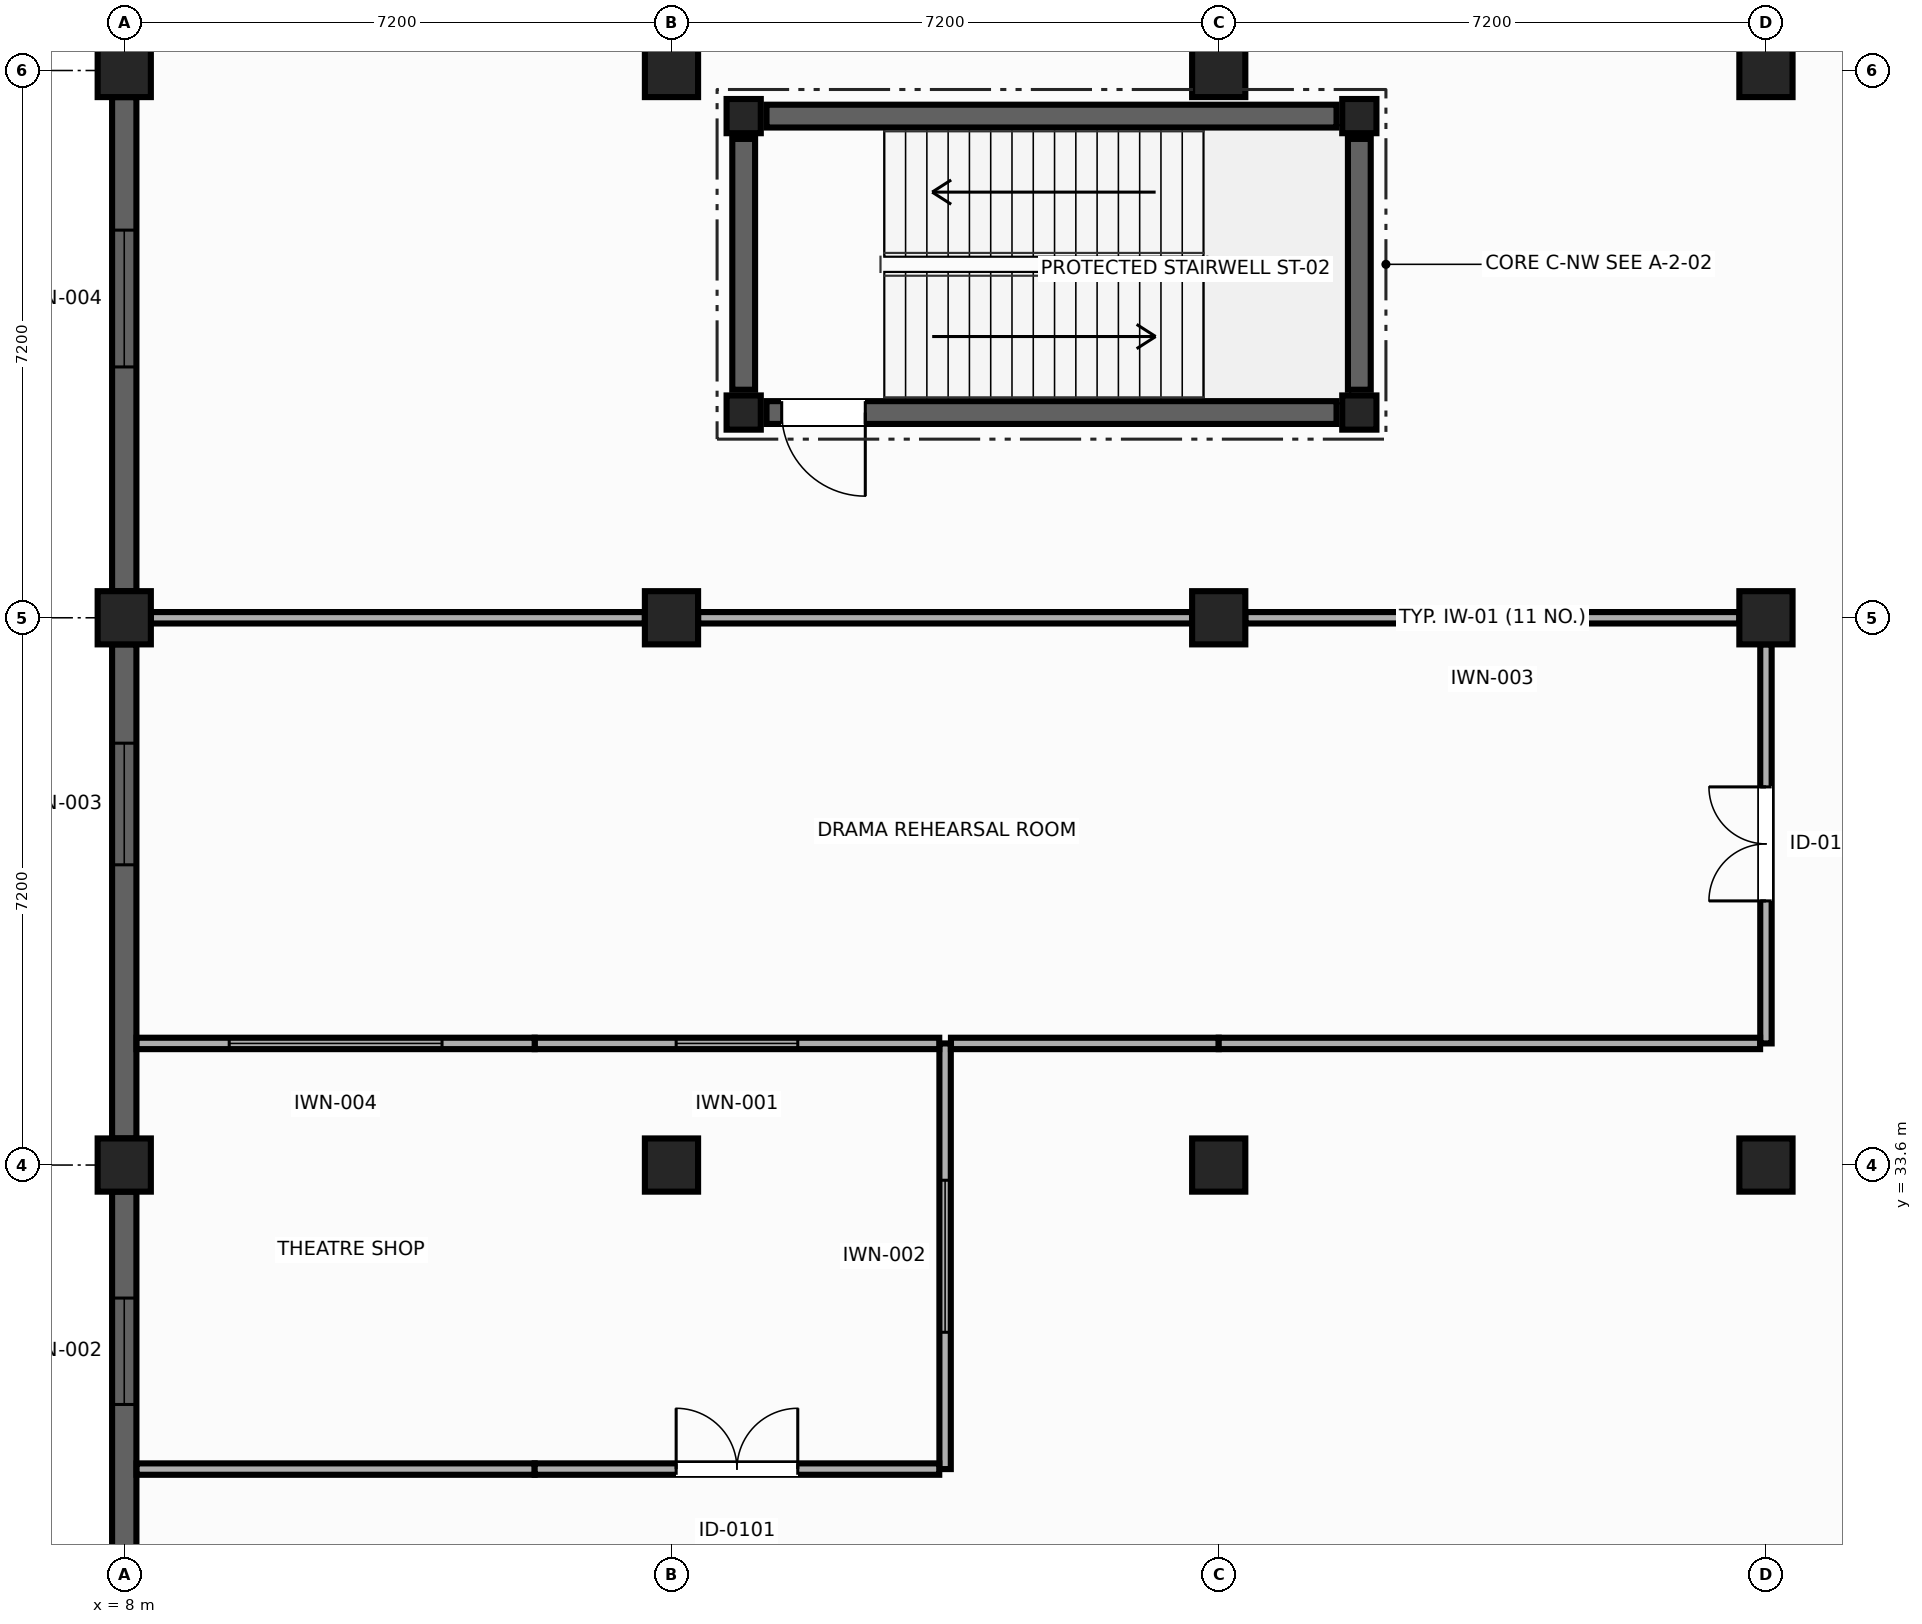
"""IFC4 building model, lengths in metres.
Left out: names, types, materials, properties, quantities, classifications, styles, units other than length and angle.
Written with IfcOpenShell. Run it as: python <this file> out.ifc"""

import sys

from ifc_helpers import new_model, si_unit, direction, frame, frame_2d, origin, origin_2d, place, context, subcontext, project, spatial, rectangle, extrude, element, fill, save


model = new_model("IFC4")
c1 = context("Model", 3, precision=1e-05, world=origin(), true_north=direction((0.0, 1.0)))
c2 = subcontext(c1, "Body", "Model", "MODEL_VIEW")
j1 = project(units=[si_unit("LENGTHUNIT", "METRE"), si_unit("PLANEANGLEUNIT", "RADIAN")], contexts=[c1])
p1 = place(None, origin())
s1 = spatial("IfcSite", under=j1, at=p1, CompositionType="ELEMENT")
p2 = place(p1, origin())
s2 = spatial("IfcBuilding", under=s1, at=p2, CompositionType="ELEMENT")
p3 = place(p2, origin())
s3 = spatial("IfcBuildingStorey", under=s2, at=p3, CompositionType="ELEMENT", Elevation=0.0)
for number, where, z_axis, x_axis in (
    (1, (8.0, 33.6, 0.0), (0.0, 0.0, 1.0), (0.0, 1.0, 0.0)),
    (2, (15.2, 33.6, 0.0), (0.0, 0.0, 1.0), (1.0, 0.0, 0.0)),
):
    element("IfcColumn", number, at=place(p3, frame(where, z_axis=z_axis, x_axis=x_axis)), inside=s3, PredefinedType="COLUMN", context=c2, shape_type="SweptSolid", body=[
        extrude(rectangle(XDim=0.7, YDim=0.7, at=origin_2d()), origin(), (0.0, 0.0, 1.0), 5.4),
    ])
for number, where, z_axis, x_axis in (
    (3, (22.4, 33.6, 0.0), (0.0, 0.0, 1.0), (1.0, 0.0, 0.0)),
    (4, (29.6, 33.6, 0.0), (0.0, 0.0, 1.0), (0.0, 1.0, 0.0)),
):
    element("IfcColumn", number, at=place(p3, frame(where, z_axis=z_axis, x_axis=x_axis)), inside=s3, PredefinedType="COLUMN", context=c2, shape_type="SweptSolid", body=[
        extrude(rectangle(XDim=0.7, YDim=0.7, at=origin_2d()), origin(), (0.0, 0.0, 1.0), 5.12),
    ])
for number, where, z_axis, x_axis in (
    (5, (8.0, 40.8, 0.0), (0.0, 0.0, 1.0), (1.0, 0.0, 0.0)),
    (6, (15.2, 40.8, 0.0), (0.0, 0.0, 1.0), (1.0, 0.0, 0.0)),
):
    element("IfcColumn", number, at=place(p3, frame(where, z_axis=z_axis, x_axis=x_axis)), inside=s3, PredefinedType="COLUMN", context=c2, shape_type="SweptSolid", body=[
        extrude(rectangle(XDim=0.7, YDim=0.7, at=origin_2d()), origin(), (0.0, 0.0, 1.0), 5.4),
    ])
for number, where, z_axis, x_axis in (
    (7, (22.4, 40.8, 0.0), (0.0, 0.0, 1.0), (0.0, 1.0, 0.0)),
    (8, (29.6, 40.8, 0.0), (0.0, 0.0, 1.0), (1.0, 0.0, 0.0)),
):
    element("IfcColumn", number, at=place(p3, frame(where, z_axis=z_axis, x_axis=x_axis)), inside=s3, PredefinedType="COLUMN", context=c2, shape_type="SweptSolid", body=[
        extrude(rectangle(XDim=0.7, YDim=0.7, at=origin_2d()), origin(), (0.0, 0.0, 1.0), 5.12),
    ])
for number, where, z_axis, x_axis in (
    (9, (8.0, 48.0, 0.0), (0.0, 0.0, 1.0), (1.0, 0.0, 0.0)),
    (10, (15.2, 48.0, 0.0), (0.0, 0.0, 1.0), (0.0, 1.0, 0.0)),
    (11, (22.4, 48.0, 0.0), (0.0, 0.0, 1.0), (1.0, 0.0, 0.0)),
    (12, (29.6, 48.0, 0.0), (0.0, 0.0, 1.0), (0.0, 1.0, 0.0)),
):
    element("IfcColumn", number, at=place(p3, frame(where, z_axis=z_axis, x_axis=x_axis)), inside=s3, PredefinedType="COLUMN", context=c2, shape_type="SweptSolid", body=[
        extrude(rectangle(XDim=0.7, YDim=0.7, at=origin_2d()), origin(), (0.0, 0.0, 1.0), 5.4),
    ])
for number, where, z_axis, x_axis in (
    (13, (16.15, 43.5, 0.0), (0.0, 0.0, 1.0), (1.0, 0.0, 0.0)),
    (14, (24.25, 43.5, 0.0), (0.0, 0.0, 1.0), (1.0, 0.0, 0.0)),
    (15, (24.25, 47.4, 0.0), (0.0, 0.0, 1.0), (1.0, 0.0, 0.0)),
    (16, (16.15, 47.4, 0.0), (0.0, 0.0, 1.0), (1.0, 0.0, 0.0)),
):
    element("IfcColumn", number, at=place(p3, frame(where, z_axis=z_axis, x_axis=x_axis)), inside=s3, PredefinedType="COLUMN", context=c2, shape_type="SweptSolid", body=[
        extrude(rectangle(XDim=0.45, YDim=0.45, at=origin_2d()), origin(), (0.0, 0.0, 1.0), 5.4),
    ])
p4 = place(p3, frame((8.0, 26.75, 0.0), z_axis=(0.0, 0.0, 1.0), x_axis=(0.0, 1.0, 0.0)))
e17 = element("IfcWall", 17, at=p4, inside=s3, PredefinedType="SOLIDWALL", context=c2, shape_type="SweptSolid", body=[
    extrude(rectangle(XDim=6.5, YDim=0.32, at=frame_2d((3.25, 0.0))), origin(), (0.0, 0.0, 1.0), 5.12),
])
p5 = place(p4, frame((3.7, 0.0, 0.9)))
e18 = element("IfcOpeningElement", 18, at=p5, cuts=e17, PredefinedType="OPENING", context=c2, shape_type="SweptSolid", body=[
    extrude(rectangle(XDim=1.4, YDim=1.8, at=frame_2d((0.7, 0.9))), frame((0.0, 0.17, 0.0), z_axis=(0.0, -1.0, 0.0), x_axis=(1.0, 0.0, 0.0)), (0.0, 0.0, 1.0), 0.34),
])
p6 = place(p3, frame((8.0, 33.95, 0.0), z_axis=(0.0, 0.0, 1.0), x_axis=(0.0, 1.0, 0.0)))
e19 = element("IfcWall", 19, at=p6, inside=s3, PredefinedType="SOLIDWALL", context=c2, shape_type="SweptSolid", body=[
    extrude(rectangle(XDim=6.5, YDim=0.32, at=frame_2d((3.25, 0.0))), origin(), (0.0, 0.0, 1.0), 5.12),
])
p7 = place(p6, frame((3.6, 0.0, 0.9)))
e20 = element("IfcOpeningElement", 20, at=p7, cuts=e19, PredefinedType="OPENING", context=c2, shape_type="SweptSolid", body=[
    extrude(rectangle(XDim=1.6, YDim=1.8, at=frame_2d((0.8, 0.9))), frame((0.0, 0.17, 0.0), z_axis=(0.0, -1.0, 0.0), x_axis=(1.0, 0.0, 0.0)), (0.0, 0.0, 1.0), 0.34),
])
p8 = place(p3, frame((8.0, 41.15, 0.0), z_axis=(0.0, 0.0, 1.0), x_axis=(0.0, 1.0, 0.0)))
e21 = element("IfcWall", 21, at=p8, inside=s3, PredefinedType="SOLIDWALL", context=c2, shape_type="SweptSolid", body=[
    extrude(rectangle(XDim=6.5, YDim=0.32, at=frame_2d((3.25, 0.0))), origin(), (0.0, 0.0, 1.0), 5.12),
])
p9 = place(p8, frame((2.95, 0.0, 0.9)))
e22 = element("IfcOpeningElement", 22, at=p9, cuts=e21, PredefinedType="OPENING", context=c2, shape_type="SweptSolid", body=[
    extrude(rectangle(XDim=1.8, YDim=1.8, at=frame_2d((0.9, 0.9))), frame((0.0, 0.17, 0.0), z_axis=(0.0, -1.0, 0.0), x_axis=(1.0, 0.0, 0.0)), (0.0, 0.0, 1.0), 0.34),
])
p10 = place(p3, frame((23.95, 43.5, 0.0), z_axis=(0.0, 0.0, 1.0), x_axis=(-1.0, 0.0, 0.0)))
e23 = element("IfcWall", 23, at=p10, inside=s3, PredefinedType="SHEAR", context=c2, shape_type="SweptSolid", body=[
    extrude(rectangle(XDim=7.5, YDim=0.3, at=frame_2d((3.75, 0.0))), origin(), (0.0, 0.0, 1.0), 5.12),
])
p11 = place(p10, frame((6.2, 0.0, 0.0)))
e24 = element("IfcOpeningElement", 24, at=p11, cuts=e23, PredefinedType="OPENING", context=c2, shape_type="SweptSolid", body=[
    extrude(rectangle(XDim=1.1, YDim=2.15, at=frame_2d((0.55, 1.075))), frame((0.0, 0.16, 0.0), z_axis=(0.0, -1.0, 0.0), x_axis=(1.0, 0.0, 0.0)), (0.0, 0.0, 1.0), 0.32),
])
p12 = place(p3, frame((16.15, 43.8, 0.0), z_axis=(0.0, 0.0, 1.0), x_axis=(0.0, 1.0, 0.0)))
e25 = element("IfcWall", 25, at=p12, inside=s3, PredefinedType="SHEAR", context=c2, shape_type="SweptSolid", body=[
    extrude(rectangle(XDim=3.3, YDim=0.3, at=frame_2d((1.65, 0.0))), origin(), (0.0, 0.0, 1.0), 5.12),
])
p13 = place(p3, frame((16.45, 47.4, 0.0), z_axis=(0.0, 0.0, 1.0), x_axis=(1.0, 0.0, 0.0)))
e26 = element("IfcWall", 26, at=p13, inside=s3, PredefinedType="SHEAR", context=c2, shape_type="SweptSolid", body=[
    extrude(rectangle(XDim=7.5, YDim=0.3, at=frame_2d((3.75, 0.0))), origin(), (0.0, 0.0, 1.0), 5.12),
])
p14 = place(p3, frame((24.25, 47.1, 0.0), z_axis=(0.0, 0.0, 1.0), x_axis=(0.0, -1.0, 0.0)))
e27 = element("IfcWall", 27, at=p14, inside=s3, PredefinedType="SHEAR", context=c2, shape_type="SweptSolid", body=[
    extrude(rectangle(XDim=3.3, YDim=0.3, at=frame_2d((1.65, 0.0))), origin(), (0.0, 0.0, 1.0), 5.12),
])
p15 = place(p3, frame((18.8, 29.6, 0.0), z_axis=(0.0, 0.0, 1.0), x_axis=(0.0, 1.0, 0.0)))
e28 = element("IfcWall", 28, at=p15, inside=s3, PredefinedType="PARTITIONING", context=c2, shape_type="SweptSolid", body=[
    extrude(rectangle(XDim=5.6, YDim=0.15, at=frame_2d((2.8, 0.0))), origin(), (0.0, 0.0, 1.0), 3.715),
])
p16 = place(p15, frame((1.8, 0.0, 1.1)))
e29 = element("IfcOpeningElement", 29, at=p16, cuts=e28, PredefinedType="OPENING", context=c2, shape_type="SweptSolid", body=[
    extrude(rectangle(XDim=2.0, YDim=1.1, at=frame_2d((1.0, 0.55))), frame((0.0, 0.085, 0.0), z_axis=(0.0, -1.0, 0.0), x_axis=(1.0, 0.0, 0.0)), (0.0, 0.0, 1.0), 0.17),
])
p17 = place(p3, frame((18.723, 35.2, 0.0), z_axis=(0.0, 0.0, 1.0), x_axis=(-1.0, 0.0, 0.0)))
e30 = element("IfcWall", 30, at=p17, inside=s3, PredefinedType="PARTITIONING", context=c2, shape_type="SweptSolid", body=[
    extrude(rectangle(XDim=5.323, YDim=0.15, at=frame_2d((2.662, 0.0))), origin(), (0.0, 0.0, 1.0), 4.315),
])
p18 = place(p17, frame((1.862, 0.0, 1.1)))
e31 = element("IfcOpeningElement", 31, at=p18, cuts=e30, PredefinedType="OPENING", context=c2, shape_type="SweptSolid", body=[
    extrude(rectangle(XDim=1.6, YDim=1.1, at=frame_2d((0.8, 0.55))), frame((0.0, 0.085, 0.0), z_axis=(0.0, -1.0, 0.0), x_axis=(1.0, 0.0, 0.0)), (0.0, 0.0, 1.0), 0.17),
])
p19 = place(p3, frame((13.4, 35.2, 0.0), z_axis=(0.0, 0.0, 1.0), x_axis=(-1.0, 0.0, 0.0)))
e32 = element("IfcWall", 32, at=p19, inside=s3, PredefinedType="PARTITIONING", context=c2, shape_type="SweptSolid", body=[
    extrude(rectangle(XDim=5.238, YDim=0.15, at=frame_2d((2.619, 0.0))), origin(), (0.0, 0.0, 1.0), 5.12),
])
p20 = place(p19, frame((1.219, 0.0, 1.1)))
e33 = element("IfcOpeningElement", 33, at=p20, cuts=e32, PredefinedType="OPENING", context=c2, shape_type="SweptSolid", body=[
    extrude(rectangle(XDim=2.8, YDim=1.1, at=frame_2d((1.4, 0.55))), frame((0.0, 0.085, 0.0), z_axis=(0.0, -1.0, 0.0), x_axis=(1.0, 0.0, 0.0)), (0.0, 0.0, 1.0), 0.17),
])
p21 = place(p3, frame((8.162, 29.6, 0.0), z_axis=(0.0, 0.0, 1.0), x_axis=(1.0, 0.0, 0.0)))
e34 = element("IfcWall", 34, at=p21, inside=s3, PredefinedType="PARTITIONING", context=c2, shape_type="SweptSolid", body=[
    extrude(rectangle(XDim=5.238, YDim=0.15, at=frame_2d((2.619, 0.0))), origin(), (0.0, 0.0, 1.0), 5.12),
])
p22 = place(p3, frame((13.4, 29.6, 0.0), z_axis=(0.0, 0.0, 1.0), x_axis=(1.0, 0.0, 0.0)))
e35 = element("IfcWall", 35, at=p22, inside=s3, PredefinedType="PARTITIONING", context=c2, shape_type="SweptSolid", body=[
    extrude(rectangle(XDim=5.323, YDim=0.15, at=frame_2d((2.662, 0.0))), origin(), (0.0, 0.0, 1.0), 4.315),
])
p23 = place(p22, frame((1.862, 0.0, 0.0)))
e36 = element("IfcOpeningElement", 36, at=p23, cuts=e35, PredefinedType="OPENING", context=c2, shape_type="SweptSolid", body=[
    extrude(rectangle(XDim=1.6, YDim=2.25, at=frame_2d((0.8, 1.125))), frame((0.0, 0.085, 0.0), z_axis=(0.0, -1.0, 0.0), x_axis=(1.0, 0.0, 0.0)), (0.0, 0.0, 1.0), 0.17),
])
p24 = place(p3, frame((29.6, 35.2, 0.0), z_axis=(0.0, 0.0, 1.0), x_axis=(0.0, 1.0, 0.0)))
e37 = element("IfcWall", 37, at=p24, inside=s3, PredefinedType="PARTITIONING", context=c2, shape_type="SweptSolid", body=[
    extrude(rectangle(XDim=5.25, YDim=0.15, at=frame_2d((2.625, 0.0))), origin(), (0.0, 0.0, 1.0), 4.315),
])
p25 = place(p24, frame((1.875, 0.0, 0.0)))
e38 = element("IfcOpeningElement", 38, at=p25, cuts=e37, PredefinedType="OPENING", context=c2, shape_type="SweptSolid", body=[
    extrude(rectangle(XDim=1.5, YDim=2.2, at=frame_2d((0.75, 1.1))), frame((0.0, 0.085, 0.0), z_axis=(0.0, -1.0, 0.0), x_axis=(1.0, 0.0, 0.0)), (0.0, 0.0, 1.0), 0.17),
])
p26 = place(p3, frame((29.25, 40.8, 0.0), z_axis=(0.0, 0.0, 1.0), x_axis=(-1.0, 0.0, 0.0)))
e39 = element("IfcWall", 39, at=p26, inside=s3, PredefinedType="PARTITIONING", context=c2, shape_type="SweptSolid", body=[
    extrude(rectangle(XDim=6.5, YDim=0.15, at=frame_2d((3.25, 0.0))), origin(), (0.0, 0.0, 1.0), 4.315),
])
p27 = place(p26, frame((2.05, 0.0, 1.1)))
e40 = element("IfcOpeningElement", 40, at=p27, cuts=e39, PredefinedType="OPENING", context=c2, shape_type="SweptSolid", body=[
    extrude(rectangle(XDim=2.4, YDim=1.1, at=frame_2d((1.2, 0.55))), frame((0.0, 0.085, 0.0), z_axis=(0.0, -1.0, 0.0), x_axis=(1.0, 0.0, 0.0)), (0.0, 0.0, 1.0), 0.17),
])
p28 = place(p3, frame((22.05, 40.8, 0.0), z_axis=(0.0, 0.0, 1.0), x_axis=(-1.0, 0.0, 0.0)))
e41 = element("IfcWall", 41, at=p28, inside=s3, PredefinedType="PARTITIONING", context=c2, shape_type="SweptSolid", body=[
    extrude(rectangle(XDim=6.5, YDim=0.15, at=frame_2d((3.25, 0.0))), origin(), (0.0, 0.0, 1.0), 3.715),
])
p29 = place(p3, frame((14.85, 40.8, 0.0), z_axis=(0.0, 0.0, 1.0), x_axis=(-1.0, 0.0, 0.0)))
e42 = element("IfcWall", 42, at=p29, inside=s3, PredefinedType="PARTITIONING", context=c2, shape_type="SweptSolid", body=[
    extrude(rectangle(XDim=6.5, YDim=0.15, at=frame_2d((3.25, 0.0))), origin(), (0.0, 0.0, 1.0), 4.315),
])
p30 = place(p3, frame((18.877, 35.2, 0.0), z_axis=(0.0, 0.0, 1.0), x_axis=(1.0, 0.0, 0.0)))
e43 = element("IfcWall", 43, at=p30, inside=s3, PredefinedType="PARTITIONING", context=c2, shape_type="SweptSolid", body=[
    extrude(rectangle(XDim=3.523, YDim=0.15, at=frame_2d((1.761, 0.0))), origin(), (0.0, 0.0, 1.0), 4.315),
])
p31 = place(p3, frame((22.4, 35.2, 0.0), z_axis=(0.0, 0.0, 1.0), x_axis=(1.0, 0.0, 0.0)))
e44 = element("IfcWall", 44, at=p31, inside=s3, PredefinedType="PARTITIONING", context=c2, shape_type="SweptSolid", body=[
    extrude(rectangle(XDim=7.123, YDim=0.15, at=frame_2d((3.562, 0.0))), origin(), (0.0, 0.0, 1.0), 4.315),
])
p32 = place(p5, origin())
e45 = element("IfcWindow", 45, at=p32, inside=s3, PartitioningType="SINGLE_PANEL", PredefinedType="WINDOW", context=c2, shape_type="SweptSolid", body=[
    extrude(rectangle(XDim=1.4, YDim=1.8, at=frame_2d((0.7, 0.9))), frame((0.0, 0.03, 0.0), z_axis=(0.0, -1.0, 0.0), x_axis=(1.0, 0.0, 0.0)), (0.0, 0.0, 1.0), 0.06),
])
fill(e18, e45)
p33 = place(p7, origin())
e46 = element("IfcWindow", 46, at=p33, inside=s3, PartitioningType="SINGLE_PANEL", PredefinedType="WINDOW", context=c2, shape_type="SweptSolid", body=[
    extrude(rectangle(XDim=1.6, YDim=1.8, at=frame_2d((0.8, 0.9))), frame((0.0, 0.03, 0.0), z_axis=(0.0, -1.0, 0.0), x_axis=(1.0, 0.0, 0.0)), (0.0, 0.0, 1.0), 0.06),
])
fill(e20, e46)
p34 = place(p9, origin())
e47 = element("IfcWindow", 47, at=p34, inside=s3, PartitioningType="SINGLE_PANEL", PredefinedType="WINDOW", context=c2, shape_type="SweptSolid", body=[
    extrude(rectangle(XDim=1.8, YDim=1.8, at=frame_2d((0.9, 0.9))), frame((0.0, 0.03, 0.0), z_axis=(0.0, -1.0, 0.0), x_axis=(1.0, 0.0, 0.0)), (0.0, 0.0, 1.0), 0.06),
])
fill(e22, e47)
p35 = place(p11, origin())
e48 = element("IfcDoor", 48, at=p35, inside=s3, OperationType="SINGLE_SWING_LEFT", PredefinedType="DOOR", context=c2, shape_type="SweptSolid", body=[
    extrude(rectangle(XDim=1.1, YDim=2.15, at=frame_2d((0.55, 1.075))), frame((0.0, 0.025, 0.0), z_axis=(0.0, -1.0, 0.0), x_axis=(1.0, 0.0, 0.0)), (0.0, 0.0, 1.0), 0.05),
])
fill(e24, e48)
p36 = place(p23, origin())
e49 = element("IfcDoor", 49, at=p36, inside=s3, OperationType="DOUBLE_DOOR_SINGLE_SWING", PredefinedType="DOOR", context=c2, shape_type="SweptSolid", body=[
    extrude(rectangle(XDim=1.6, YDim=2.25, at=frame_2d((0.8, 1.125))), frame((0.0, 0.025, 0.0), z_axis=(0.0, -1.0, 0.0), x_axis=(1.0, 0.0, 0.0)), (0.0, 0.0, 1.0), 0.05),
])
fill(e36, e49)
p37 = place(p18, origin())
e50 = element("IfcWindow", 50, at=p37, inside=s3, PartitioningType="SINGLE_PANEL", PredefinedType="WINDOW", context=c2, shape_type="SweptSolid", body=[
    extrude(rectangle(XDim=1.6, YDim=1.1, at=frame_2d((0.8, 0.55))), frame((0.0, 0.03, 0.0), z_axis=(0.0, -1.0, 0.0), x_axis=(1.0, 0.0, 0.0)), (0.0, 0.0, 1.0), 0.06),
])
fill(e31, e50)
p38 = place(p16, origin())
e51 = element("IfcWindow", 51, at=p38, inside=s3, PartitioningType="SINGLE_PANEL", PredefinedType="WINDOW", context=c2, shape_type="SweptSolid", body=[
    extrude(rectangle(XDim=2.0, YDim=1.1, at=frame_2d((1.0, 0.55))), frame((0.0, 0.03, 0.0), z_axis=(0.0, -1.0, 0.0), x_axis=(1.0, 0.0, 0.0)), (0.0, 0.0, 1.0), 0.06),
])
fill(e29, e51)
p39 = place(p25, origin())
e52 = element("IfcDoor", 52, at=p39, inside=s3, OperationType="DOUBLE_DOOR_SINGLE_SWING", PredefinedType="DOOR", context=c2, shape_type="SweptSolid", body=[
    extrude(rectangle(XDim=1.5, YDim=2.2, at=frame_2d((0.75, 1.1))), frame((0.0, 0.025, 0.0), z_axis=(0.0, -1.0, 0.0), x_axis=(1.0, 0.0, 0.0)), (0.0, 0.0, 1.0), 0.05),
])
fill(e38, e52)
p40 = place(p27, origin())
e53 = element("IfcWindow", 53, at=p40, inside=s3, PartitioningType="SINGLE_PANEL", PredefinedType="WINDOW", context=c2, shape_type="SweptSolid", body=[
    extrude(rectangle(XDim=2.4, YDim=1.1, at=frame_2d((1.2, 0.55))), frame((0.0, 0.03, 0.0), z_axis=(0.0, -1.0, 0.0), x_axis=(1.0, 0.0, 0.0)), (0.0, 0.0, 1.0), 0.06),
])
fill(e40, e53)
p41 = place(p20, origin())
e54 = element("IfcWindow", 54, at=p41, inside=s3, PartitioningType="SINGLE_PANEL", PredefinedType="WINDOW", context=c2, shape_type="SweptSolid", body=[
    extrude(rectangle(XDim=2.8, YDim=1.1, at=frame_2d((1.4, 0.55))), frame((0.0, 0.03, 0.0), z_axis=(0.0, -1.0, 0.0), x_axis=(1.0, 0.0, 0.0)), (0.0, 0.0, 1.0), 0.06),
])
fill(e33, e54)
save(model, sys.argv[1])
